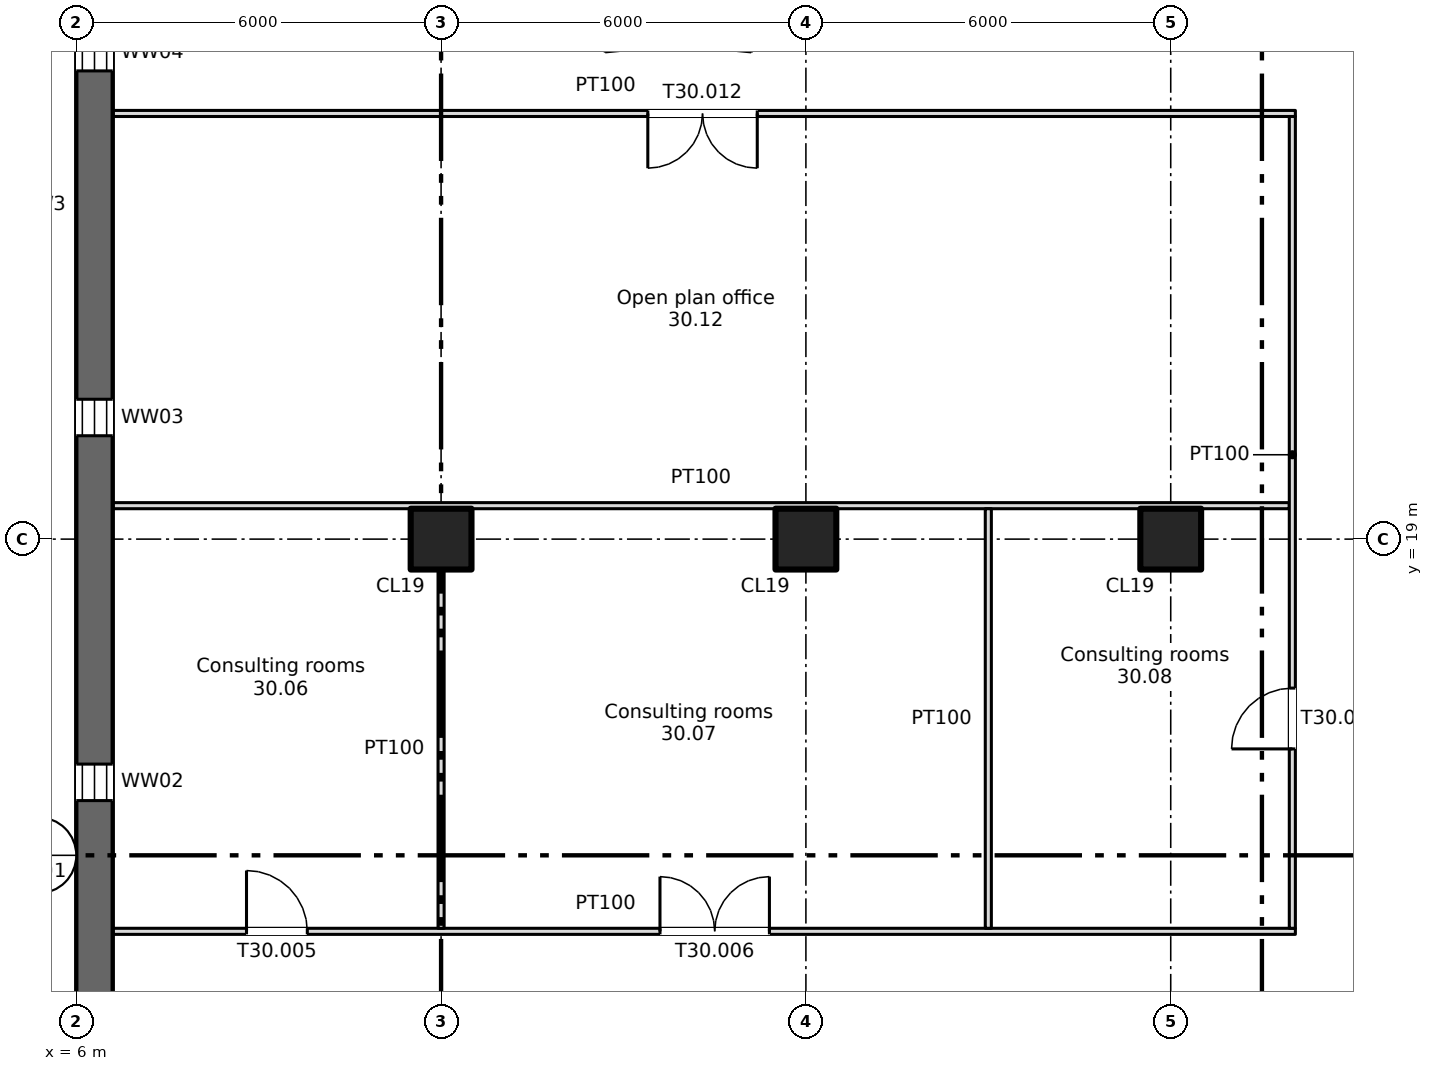
"""IFC4 building model, lengths in metres.
Left out: names, types, materials, properties, quantities, classifications, styles, units other than length and angle.
Written with IfcOpenShell. Run it as: python <this file> out.ifc"""

import sys

from ifc_helpers import new_model, si_unit, direction, frame, frame_2d, origin, origin_2d, place, context, subcontext, project, spatial, rectangle, extrude, element, fill, save


model = new_model("IFC4")
c1 = context("Model", 3, precision=1e-05, world=origin(), true_north=direction((0.0, 1.0)))
c2 = subcontext(c1, "Body", "Model", "MODEL_VIEW")
j1 = project(units=[si_unit("LENGTHUNIT", "METRE"), si_unit("PLANEANGLEUNIT", "RADIAN")], contexts=[c1])
p1 = place(None, origin())
s1 = spatial("IfcSite", under=j1, at=p1, CompositionType="ELEMENT")
p2 = place(p1, origin())
s2 = spatial("IfcBuilding", under=s1, at=p2, CompositionType="ELEMENT")
p3 = place(p2, frame((0.0, 0.0, 211.75)))
s3 = spatial("IfcBuildingStorey", under=s2, at=p3, CompositionType="ELEMENT", Elevation=211.75)
for number, where, z_axis, x_axis in (
    (1, (12.0, 19.0, 0.0), (0.0, 0.0, 1.0), (1.0, 0.0, 0.0)),
    (2, (18.0, 19.0, 0.0), (0.0, 0.0, 1.0), (1.0, 0.0, 0.0)),
    (3, (24.0, 19.0, 0.0), (0.0, 0.0, 1.0), (1.0, 0.0, 0.0)),
):
    element("IfcColumn", number, at=place(p3, frame(where, z_axis=z_axis, x_axis=x_axis)), inside=s3, PredefinedType="COLUMN", context=c2, shape_type="SweptSolid", body=[
        extrude(rectangle(XDim=1.0, YDim=1.0, at=origin_2d()), origin(), (0.0, 0.0, 1.0), 3.35),
    ])
p4 = place(p3, frame((6.3, 7.5, 0.0), z_axis=(0.0, 0.0, 1.0), x_axis=(0.0, 1.0, 0.0)))
e4 = element("IfcWall", 4, at=p4, inside=s3, PredefinedType="SHEAR", context=c2, shape_type="SweptSolid", body=[
    extrude(rectangle(XDim=34.0, YDim=0.6, at=frame_2d((17.0, 0.0))), origin(), (0.0, 0.0, 1.0), 3.35),
])
p5 = place(p4, frame((1.2, 0.0, 0.6)))
e5 = element("IfcOpeningElement", 5, at=p5, cuts=e4, PredefinedType="OPENING", context=c2, shape_type="SweptSolid", body=[
    extrude(rectangle(XDim=0.6, YDim=2.4, at=frame_2d((0.3, 1.2))), frame((0.0, 0.31, 0.0), z_axis=(0.0, -1.0, 0.0), x_axis=(1.0, 0.0, 0.0)), (0.0, 0.0, 1.0), 0.62),
])
p6 = place(p4, frame((7.2, 0.0, 0.6)))
e6 = element("IfcOpeningElement", 6, at=p6, cuts=e4, PredefinedType="OPENING", context=c2, shape_type="SweptSolid", body=[
    extrude(rectangle(XDim=0.6, YDim=2.4, at=frame_2d((0.3, 1.2))), frame((0.0, 0.31, 0.0), z_axis=(0.0, -1.0, 0.0), x_axis=(1.0, 0.0, 0.0)), (0.0, 0.0, 1.0), 0.62),
])
p7 = place(p4, frame((13.2, 0.0, 0.6)))
e7 = element("IfcOpeningElement", 7, at=p7, cuts=e4, PredefinedType="OPENING", context=c2, shape_type="SweptSolid", body=[
    extrude(rectangle(XDim=0.6, YDim=2.4, at=frame_2d((0.3, 1.2))), frame((0.0, 0.31, 0.0), z_axis=(0.0, -1.0, 0.0), x_axis=(1.0, 0.0, 0.0)), (0.0, 0.0, 1.0), 0.62),
])
p8 = place(p4, frame((19.2, 0.0, 0.6)))
e8 = element("IfcOpeningElement", 8, at=p8, cuts=e4, PredefinedType="OPENING", context=c2, shape_type="SweptSolid", body=[
    extrude(rectangle(XDim=0.6, YDim=2.4, at=frame_2d((0.3, 1.2))), frame((0.0, 0.31, 0.0), z_axis=(0.0, -1.0, 0.0), x_axis=(1.0, 0.0, 0.0)), (0.0, 0.0, 1.0), 0.62),
])
p9 = place(p3, frame((6.6, 12.55, 0.0), z_axis=(0.0, 0.0, 1.0), x_axis=(1.0, 0.0, 0.0)))
e9 = element("IfcWall", 9, at=p9, inside=s3, PredefinedType="PARTITIONING", context=c2, shape_type="SweptSolid", body=[
    extrude(rectangle(XDim=19.45, YDim=0.1, at=frame_2d((9.725, 0.0))), origin(), (0.0, 0.0, 1.0), 3.35),
])
p10 = place(p9, frame((2.2, 0.0, 0.0)))
e10 = element("IfcOpeningElement", 10, at=p10, cuts=e9, PredefinedType="OPENING", context=c2, shape_type="SweptSolid", body=[
    extrude(rectangle(XDim=1.0, YDim=2.1, at=frame_2d((0.5, 1.05))), frame((0.0, 0.06, 0.0), z_axis=(0.0, -1.0, 0.0), x_axis=(1.0, 0.0, 0.0)), (0.0, 0.0, 1.0), 0.12),
])
p11 = place(p9, frame((9.0, 0.0, 0.0)))
e11 = element("IfcOpeningElement", 11, at=p11, cuts=e9, PredefinedType="OPENING", context=c2, shape_type="SweptSolid", body=[
    extrude(rectangle(XDim=1.8, YDim=2.1, at=frame_2d((0.9, 1.05))), frame((0.0, 0.06, 0.0), z_axis=(0.0, -1.0, 0.0), x_axis=(1.0, 0.0, 0.0)), (0.0, 0.0, 1.0), 0.12),
])
p12 = place(p3, frame((6.6, 19.55, 0.0), z_axis=(0.0, 0.0, 1.0), x_axis=(1.0, 0.0, 0.0)))
e12 = element("IfcWall", 12, at=p12, inside=s3, PredefinedType="PARTITIONING", context=c2, shape_type="SweptSolid", body=[
    extrude(rectangle(XDim=19.35, YDim=0.1, at=frame_2d((9.675, 0.0))), origin(), (0.0, 0.0, 1.0), 3.35),
])
p13 = place(p3, frame((6.6, 26.0, 0.0), z_axis=(0.0, 0.0, 1.0), x_axis=(1.0, 0.0, 0.0)))
e13 = element("IfcWall", 13, at=p13, inside=s3, PredefinedType="PARTITIONING", context=c2, shape_type="SweptSolid", body=[
    extrude(rectangle(XDim=19.45, YDim=0.1, at=frame_2d((9.725, 0.0))), origin(), (0.0, 0.0, 1.0), 3.35),
])
p14 = place(p13, frame((8.8, 0.0, 0.0)))
e14 = element("IfcOpeningElement", 14, at=p14, cuts=e13, PredefinedType="OPENING", context=c2, shape_type="SweptSolid", body=[
    extrude(rectangle(XDim=1.8, YDim=2.1, at=frame_2d((0.9, 1.05))), frame((0.0, 0.06, 0.0), z_axis=(0.0, -1.0, 0.0), x_axis=(1.0, 0.0, 0.0)), (0.0, 0.0, 1.0), 0.12),
])
p15 = place(p3, frame((12.0, 12.6, 0.0), z_axis=(0.0, 0.0, 1.0), x_axis=(0.0, 1.0, 0.0)))
e15 = element("IfcWall", 15, at=p15, inside=s3, PredefinedType="PARTITIONING", context=c2, shape_type="SweptSolid", body=[
    extrude(rectangle(XDim=5.9, YDim=0.1, at=frame_2d((2.95, 0.0))), origin(), (0.0, 0.0, 1.0), 3.35),
])
p16 = place(p3, frame((21.0, 12.6, 0.0), z_axis=(0.0, 0.0, 1.0), x_axis=(0.0, 1.0, 0.0)))
e16 = element("IfcWall", 16, at=p16, inside=s3, PredefinedType="PARTITIONING", context=c2, shape_type="SweptSolid", body=[
    extrude(rectangle(XDim=6.9, YDim=0.1, at=frame_2d((3.45, 0.0))), origin(), (0.0, 0.0, 1.0), 3.35),
])
p17 = place(p3, frame((26.0, 12.6, 0.0), z_axis=(0.0, 0.0, 1.0), x_axis=(0.0, 1.0, 0.0)))
e17 = element("IfcWall", 17, at=p17, inside=s3, PredefinedType="PARTITIONING", context=c2, shape_type="SweptSolid", body=[
    extrude(rectangle(XDim=13.35, YDim=0.1, at=frame_2d((6.675, 0.0))), origin(), (0.0, 0.0, 1.0), 3.35),
])
p18 = place(p17, frame((2.95, 0.0, 0.0)))
e18 = element("IfcOpeningElement", 18, at=p18, cuts=e17, PredefinedType="OPENING", context=c2, shape_type="SweptSolid", body=[
    extrude(rectangle(XDim=1.0, YDim=2.1, at=frame_2d((0.5, 1.05))), frame((0.0, 0.06, 0.0), z_axis=(0.0, -1.0, 0.0), x_axis=(1.0, 0.0, 0.0)), (0.0, 0.0, 1.0), 0.12),
])
p19 = place(p6, origin())
e19 = element("IfcWindow", 19, at=p19, inside=s3, PartitioningType="SINGLE_PANEL", PredefinedType="WINDOW", context=c2, shape_type="SweptSolid", body=[
    extrude(rectangle(XDim=0.6, YDim=2.4, at=frame_2d((0.3, 1.2))), frame((0.0, 0.03, 0.0), z_axis=(0.0, -1.0, 0.0), x_axis=(1.0, 0.0, 0.0)), (0.0, 0.0, 1.0), 0.06),
])
fill(e6, e19)
p20 = place(p7, origin())
e20 = element("IfcWindow", 20, at=p20, inside=s3, PartitioningType="SINGLE_PANEL", PredefinedType="WINDOW", context=c2, shape_type="SweptSolid", body=[
    extrude(rectangle(XDim=0.6, YDim=2.4, at=frame_2d((0.3, 1.2))), frame((0.0, 0.03, 0.0), z_axis=(0.0, -1.0, 0.0), x_axis=(1.0, 0.0, 0.0)), (0.0, 0.0, 1.0), 0.06),
])
fill(e7, e20)
p21 = place(p8, origin())
e21 = element("IfcWindow", 21, at=p21, inside=s3, PartitioningType="SINGLE_PANEL", PredefinedType="WINDOW", context=c2, shape_type="SweptSolid", body=[
    extrude(rectangle(XDim=0.6, YDim=2.4, at=frame_2d((0.3, 1.2))), frame((0.0, 0.03, 0.0), z_axis=(0.0, -1.0, 0.0), x_axis=(1.0, 0.0, 0.0)), (0.0, 0.0, 1.0), 0.06),
])
fill(e8, e21)
p22 = place(p10, origin())
e22 = element("IfcDoor", 22, at=p22, inside=s3, OperationType="SINGLE_SWING_LEFT", PredefinedType="DOOR", context=c2, shape_type="SweptSolid", body=[
    extrude(rectangle(XDim=1.0, YDim=2.1, at=frame_2d((0.5, 1.05))), frame((0.0, 0.025, 0.0), z_axis=(0.0, -1.0, 0.0), x_axis=(1.0, 0.0, 0.0)), (0.0, 0.0, 1.0), 0.05),
])
fill(e10, e22)
p23 = place(p11, origin())
e23 = element("IfcDoor", 23, at=p23, inside=s3, OperationType="DOUBLE_DOOR_SINGLE_SWING", PredefinedType="DOOR", context=c2, shape_type="SweptSolid", body=[
    extrude(rectangle(XDim=1.8, YDim=2.1, at=frame_2d((0.9, 1.05))), frame((0.0, 0.025, 0.0), z_axis=(0.0, -1.0, 0.0), x_axis=(1.0, 0.0, 0.0)), (0.0, 0.0, 1.0), 0.05),
])
fill(e11, e23)
p24 = place(p18, origin())
e24 = element("IfcDoor", 24, at=p24, inside=s3, OperationType="SINGLE_SWING_LEFT", PredefinedType="DOOR", context=c2, shape_type="SweptSolid", body=[
    extrude(rectangle(XDim=1.0, YDim=2.1, at=frame_2d((0.5, 1.05))), frame((0.0, 0.025, 0.0), z_axis=(0.0, -1.0, 0.0), x_axis=(1.0, 0.0, 0.0)), (0.0, 0.0, 1.0), 0.05),
])
fill(e18, e24)
p25 = place(p14, origin())
e25 = element("IfcDoor", 25, at=p25, inside=s3, OperationType="DOUBLE_DOOR_SINGLE_SWING", PredefinedType="DOOR", context=c2, shape_type="SweptSolid", body=[
    extrude(rectangle(XDim=1.8, YDim=2.1, at=frame_2d((0.9, 1.05))), frame((0.0, 0.025, 0.0), z_axis=(0.0, -1.0, 0.0), x_axis=(1.0, 0.0, 0.0)), (0.0, 0.0, 1.0), 0.05),
])
fill(e14, e25)
save(model, sys.argv[1])
